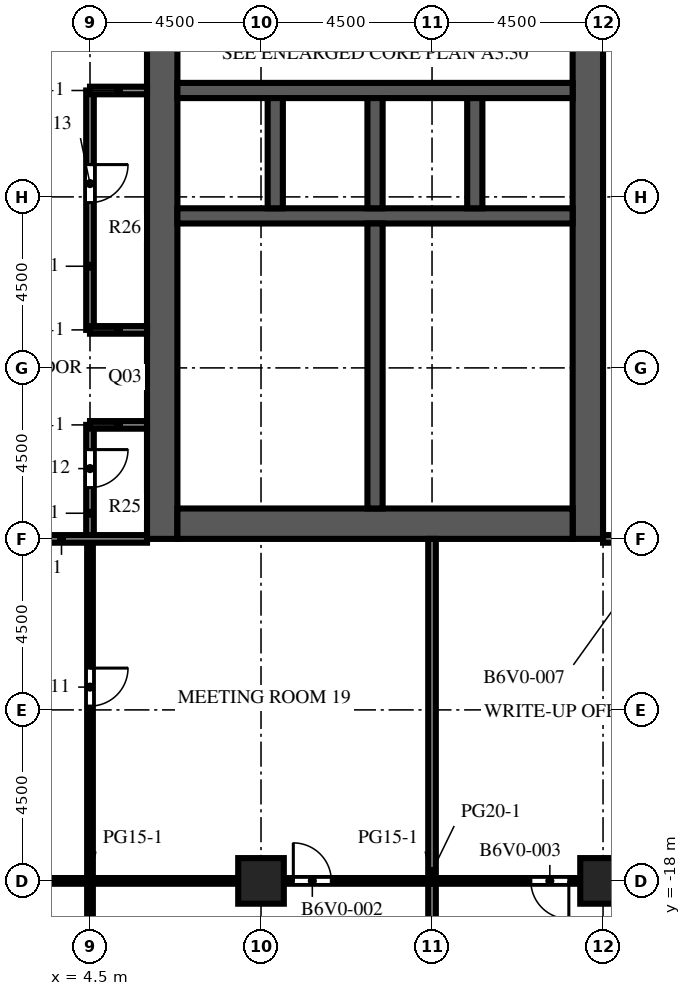
"""IFC4 building model, lengths in metres.
Left out: names, types, materials, properties, quantities, classifications, styles, units other than length and angle.
Written with IfcOpenShell. Run it as: python <this file> out.ifc"""

import sys

from ifc_helpers import new_model, si_unit, direction, frame, frame_2d, origin, origin_2d, place, context, subcontext, project, spatial, rectangle, extrude, element, fill, save


model = new_model("IFC4")
c1 = context("Model", 3, precision=1e-05, world=origin(), true_north=direction((0.0, 1.0)))
c2 = subcontext(c1, "Body", "Model", "MODEL_VIEW")
j1 = project(units=[si_unit("LENGTHUNIT", "METRE"), si_unit("PLANEANGLEUNIT", "RADIAN")], contexts=[c1])
p1 = place(None, origin())
s1 = spatial("IfcSite", under=j1, at=p1, CompositionType="ELEMENT")
p2 = place(p1, origin())
s2 = spatial("IfcBuilding", under=s1, at=p2, CompositionType="ELEMENT")
p3 = place(p2, frame((0.0, 0.0, 195.6)))
s3 = spatial("IfcBuildingStorey", under=s2, at=p3, CompositionType="ELEMENT", Elevation=195.6)
for number, where, z_axis, x_axis in (
    (1, (9.0, -18.0, 0.0), (0.0, 0.0, 1.0), (1.0, 0.0, 0.0)),
    (2, (18.0, -18.0, 0.0), (0.0, 0.0, 1.0), (1.0, 0.0, 0.0)),
):
    element("IfcColumn", number, at=place(p3, frame(where, z_axis=z_axis, x_axis=x_axis)), inside=s3, PredefinedType="COLUMN", context=c2, shape_type="SweptSolid", body=[
        extrude(rectangle(XDim=1.2, YDim=1.2, at=origin_2d()), origin(), (0.0, 0.0, 1.0), 4.1),
    ])
p4 = place(p3, frame((6.4, -9.0, 0.0), z_axis=(0.0, 0.0, 1.0), x_axis=(0.0, 1.0, 0.0)))
e3 = element("IfcWall", 3, at=p4, inside=s3, PredefinedType="SHEAR", context=c2, shape_type="SweptSolid", body=[
    extrude(rectangle(XDim=27.5, YDim=0.8, at=frame_2d((13.75, 0.0))), origin(), (0.0, 0.0, 1.0), 4.1),
])
p5 = place(p4, frame((12.55, 0.0, 0.0)))
e4 = element("IfcOpeningElement", 4, at=p5, cuts=e3, PredefinedType="OPENING", context=c2, shape_type="SweptSolid", body=[
    extrude(rectangle(XDim=2.4, YDim=2.4, at=frame_2d((1.2, 1.2))), frame((0.0, 0.41, 0.0), z_axis=(0.0, -1.0, 0.0), x_axis=(1.0, 0.0, 0.0)), (0.0, 0.0, 1.0), 0.82),
])
p6 = place(p4, frame((3.95, 0.0, 0.0)))
e5 = element("IfcOpeningElement", 5, at=p6, cuts=e3, PredefinedType="OPENING", context=c2, shape_type="SweptSolid", body=[
    extrude(rectangle(XDim=1.2, YDim=2.1, at=frame_2d((0.6, 1.05))), frame((0.0, 0.41, 0.0), z_axis=(0.0, -1.0, 0.0), x_axis=(1.0, 0.0, 0.0)), (0.0, 0.0, 1.0), 0.82),
])
p7 = place(p4, frame((19.45, 0.0, 0.0)))
e6 = element("IfcOpeningElement", 6, at=p7, cuts=e3, PredefinedType="OPENING", context=c2, shape_type="SweptSolid", body=[
    extrude(rectangle(XDim=1.0, YDim=2.1, at=frame_2d((0.5, 1.05))), frame((0.0, 0.41, 0.0), z_axis=(0.0, -1.0, 0.0), x_axis=(1.0, 0.0, 0.0)), (0.0, 0.0, 1.0), 0.82),
])
p8 = place(p4, frame((21.137, 0.0, 0.0)))
e7 = element("IfcOpeningElement", 7, at=p8, cuts=e3, PredefinedType="OPENING", context=c2, shape_type="SweptSolid", body=[
    extrude(rectangle(XDim=1.0, YDim=2.1, at=frame_2d((0.5, 1.05))), frame((0.0, 0.41, 0.0), z_axis=(0.0, -1.0, 0.0), x_axis=(1.0, 0.0, 0.0)), (0.0, 0.0, 1.0), 0.82),
])
p9 = place(p4, frame((23.2, 0.0, 0.0)))
e8 = element("IfcOpeningElement", 8, at=p9, cuts=e3, PredefinedType="OPENING", context=c2, shape_type="SweptSolid", body=[
    extrude(rectangle(XDim=1.0, YDim=2.1, at=frame_2d((0.5, 1.05))), frame((0.0, 0.41, 0.0), z_axis=(0.0, -1.0, 0.0), x_axis=(1.0, 0.0, 0.0)), (0.0, 0.0, 1.0), 0.82),
])
p10 = place(p4, frame((25.262, 0.0, 0.0)))
e9 = element("IfcOpeningElement", 9, at=p10, cuts=e3, PredefinedType="OPENING", context=c2, shape_type="SweptSolid", body=[
    extrude(rectangle(XDim=1.0, YDim=2.1, at=frame_2d((0.5, 1.05))), frame((0.0, 0.41, 0.0), z_axis=(0.0, -1.0, 0.0), x_axis=(1.0, 0.0, 0.0)), (0.0, 0.0, 1.0), 0.82),
])
p11 = place(p3, frame((17.6, -9.0, 0.0), z_axis=(0.0, 0.0, 1.0), x_axis=(0.0, 1.0, 0.0)))
e10 = element("IfcWall", 10, at=p11, inside=s3, PredefinedType="SHEAR", context=c2, shape_type="SweptSolid", body=[
    extrude(rectangle(XDim=27.5, YDim=0.8, at=frame_2d((13.75, 0.0))), origin(), (0.0, 0.0, 1.0), 4.1),
])
p12 = place(p11, frame((12.55, 0.0, 0.0)))
e11 = element("IfcOpeningElement", 11, at=p12, cuts=e10, PredefinedType="OPENING", context=c2, shape_type="SweptSolid", body=[
    extrude(rectangle(XDim=2.4, YDim=2.4, at=frame_2d((1.2, 1.2))), frame((0.0, 0.41, 0.0), z_axis=(0.0, -1.0, 0.0), x_axis=(1.0, 0.0, 0.0)), (0.0, 0.0, 1.0), 0.82),
])
p13 = place(p11, frame((6.825, 0.0, 0.0)))
e12 = element("IfcOpeningElement", 12, at=p13, cuts=e10, PredefinedType="OPENING", context=c2, shape_type="SweptSolid", body=[
    extrude(rectangle(XDim=1.2, YDim=2.1, at=frame_2d((0.6, 1.05))), frame((0.0, 0.41, 0.0), z_axis=(0.0, -1.0, 0.0), x_axis=(1.0, 0.0, 0.0)), (0.0, 0.0, 1.0), 0.82),
])
p14 = place(p11, frame((19.475, 0.0, 0.0)))
e13 = element("IfcOpeningElement", 13, at=p14, cuts=e10, PredefinedType="OPENING", context=c2, shape_type="SweptSolid", body=[
    extrude(rectangle(XDim=1.2, YDim=2.1, at=frame_2d((0.6, 1.05))), frame((0.0, 0.41, 0.0), z_axis=(0.0, -1.0, 0.0), x_axis=(1.0, 0.0, 0.0)), (0.0, 0.0, 1.0), 0.82),
])
p15 = place(p3, frame((6.8, -8.6, 0.0), z_axis=(0.0, 0.0, 1.0), x_axis=(1.0, 0.0, 0.0)))
e14 = element("IfcWall", 14, at=p15, inside=s3, PredefinedType="SHEAR", context=c2, shape_type="SweptSolid", body=[
    extrude(rectangle(XDim=10.4, YDim=0.8, at=frame_2d((5.2, 0.0))), origin(), (0.0, 0.0, 1.0), 4.1),
])
p16 = place(p3, frame((6.8, -0.5, 0.0), z_axis=(0.0, 0.0, 1.0), x_axis=(1.0, 0.0, 0.0)))
e15 = element("IfcWall", 15, at=p16, inside=s3, PredefinedType="SHEAR", context=c2, shape_type="SweptSolid", body=[
    extrude(rectangle(XDim=10.4, YDim=0.4, at=frame_2d((5.2, 0.0))), origin(), (0.0, 0.0, 1.0), 4.1),
])
p17 = place(p3, frame((6.8, 2.8, 0.0), z_axis=(0.0, 0.0, 1.0), x_axis=(1.0, 0.0, 0.0)))
e16 = element("IfcWall", 16, at=p17, inside=s3, PredefinedType="SHEAR", context=c2, shape_type="SweptSolid", body=[
    extrude(rectangle(XDim=10.4, YDim=0.4, at=frame_2d((5.2, 0.0))), origin(), (0.0, 0.0, 1.0), 4.1),
])
p18 = place(p17, frame((0.738, 0.0, 0.0)))
e17 = element("IfcOpeningElement", 17, at=p18, cuts=e16, PredefinedType="OPENING", context=c2, shape_type="SweptSolid", body=[
    extrude(rectangle(XDim=1.1, YDim=2.1, at=frame_2d((0.55, 1.05))), frame((0.0, 0.21, 0.0), z_axis=(0.0, -1.0, 0.0), x_axis=(1.0, 0.0, 0.0)), (0.0, 0.0, 1.0), 0.42),
])
p19 = place(p17, frame((3.337, 0.0, 0.0)))
e18 = element("IfcOpeningElement", 18, at=p19, cuts=e16, PredefinedType="OPENING", context=c2, shape_type="SweptSolid", body=[
    extrude(rectangle(XDim=1.1, YDim=2.1, at=frame_2d((0.55, 1.05))), frame((0.0, 0.21, 0.0), z_axis=(0.0, -1.0, 0.0), x_axis=(1.0, 0.0, 0.0)), (0.0, 0.0, 1.0), 0.42),
])
p20 = place(p17, frame((6.012, 0.0, 0.0)))
e19 = element("IfcOpeningElement", 19, at=p20, cuts=e16, PredefinedType="OPENING", context=c2, shape_type="SweptSolid", body=[
    extrude(rectangle(XDim=1.0, YDim=2.1, at=frame_2d((0.5, 1.05))), frame((0.0, 0.21, 0.0), z_axis=(0.0, -1.0, 0.0), x_axis=(1.0, 0.0, 0.0)), (0.0, 0.0, 1.0), 0.42),
])
p21 = place(p17, frame((8.613, 0.0, 0.0)))
e20 = element("IfcOpeningElement", 20, at=p21, cuts=e16, PredefinedType="OPENING", context=c2, shape_type="SweptSolid", body=[
    extrude(rectangle(XDim=1.0, YDim=2.1, at=frame_2d((0.5, 1.05))), frame((0.0, 0.21, 0.0), z_axis=(0.0, -1.0, 0.0), x_axis=(1.0, 0.0, 0.0)), (0.0, 0.0, 1.0), 0.42),
])
for number, where, z_axis, x_axis in (
    (21, (9.375, -0.3, 0.0), (0.0, 0.0, 1.0), (0.0, 1.0, 0.0)),
    (22, (12.0, -0.3, 0.0), (0.0, 0.0, 1.0), (0.0, 1.0, 0.0)),
    (23, (14.625, -0.3, 0.0), (0.0, 0.0, 1.0), (0.0, 1.0, 0.0)),
):
    element("IfcWall", number, at=place(p3, frame(where, z_axis=z_axis, x_axis=x_axis)), inside=s3, PredefinedType="SHEAR", context=c2, shape_type="SweptSolid", body=[
        extrude(rectangle(XDim=2.9, YDim=0.4, at=frame_2d((1.45, 0.0))), origin(), (0.0, 0.0, 1.0), 4.1),
    ])
p22 = place(p3, frame((12.0, -8.2, 0.0), z_axis=(0.0, 0.0, 1.0), x_axis=(0.0, 1.0, 0.0)))
e24 = element("IfcWall", 24, at=p22, inside=s3, PredefinedType="SHEAR", context=c2, shape_type="SweptSolid", body=[
    extrude(rectangle(XDim=7.5, YDim=0.4, at=frame_2d((3.75, 0.0))), origin(), (0.0, 0.0, 1.0), 4.1),
])
p23 = place(p3, frame((6.8, -5.95, 0.0), z_axis=(0.0, 0.0, 1.0), x_axis=(1.0, 0.0, 0.0)))
e25 = element("IfcWall", 25, at=p23, inside=s3, PredefinedType="PARTITIONING", context=c2, shape_type="SweptSolid", body=[
    extrude(rectangle(XDim=1.6, YDim=0.1, at=frame_2d((0.8, 0.0))), origin(), (0.0, 0.0, 1.0), 3.65),
])
p24 = place(p23, frame((0.3, 0.0, 0.0)))
e26 = element("IfcOpeningElement", 26, at=p24, cuts=e25, PredefinedType="OPENING", context=c2, shape_type="SweptSolid", body=[
    extrude(rectangle(XDim=1.0, YDim=2.1, at=frame_2d((0.5, 1.05))), frame((0.0, 0.06, 0.0), z_axis=(0.0, -1.0, 0.0), x_axis=(1.0, 0.0, 0.0)), (0.0, 0.0, 1.0), 0.12),
])
p25 = place(p3, frame((6.8, -2.95, 0.0), z_axis=(0.0, 0.0, 1.0), x_axis=(1.0, 0.0, 0.0)))
e27 = element("IfcWall", 27, at=p25, inside=s3, PredefinedType="PARTITIONING", context=c2, shape_type="SweptSolid", body=[
    extrude(rectangle(XDim=1.6, YDim=0.1, at=frame_2d((0.8, 0.0))), origin(), (0.0, 0.0, 1.0), 3.65),
])
p26 = place(p25, frame((0.3, 0.0, 0.0)))
e28 = element("IfcOpeningElement", 28, at=p26, cuts=e27, PredefinedType="OPENING", context=c2, shape_type="SweptSolid", body=[
    extrude(rectangle(XDim=1.0, YDim=2.1, at=frame_2d((0.5, 1.05))), frame((0.0, 0.06, 0.0), z_axis=(0.0, -1.0, 0.0), x_axis=(1.0, 0.0, 0.0)), (0.0, 0.0, 1.0), 0.12),
])
p27 = place(p3, frame((8.4, -5.95, 0.0), z_axis=(0.0, 0.0, 1.0), x_axis=(0.0, 1.0, 0.0)))
e29 = element("IfcWall", 29, at=p27, inside=s3, PredefinedType="PARTITIONING", context=c2, shape_type="SweptSolid", body=[
    extrude(rectangle(XDim=3.0, YDim=0.1, at=frame_2d((1.5, 0.0))), origin(), (0.0, 0.0, 1.0), 3.65),
])
p28 = place(p27, frame((1.0, 0.0, 0.0)))
e30 = element("IfcOpeningElement", 30, at=p28, cuts=e29, PredefinedType="OPENING", context=c2, shape_type="SweptSolid", body=[
    extrude(rectangle(XDim=1.0, YDim=2.1, at=frame_2d((0.5, 1.05))), frame((0.0, 0.06, 0.0), z_axis=(0.0, -1.0, 0.0), x_axis=(1.0, 0.0, 0.0)), (0.0, 0.0, 1.0), 0.12),
])
for number, where, z_axis, x_axis in (
    (31, (8.4, -5.95, 0.0), (0.0, 0.0, 1.0), (1.0, 0.0, 0.0)),
    (32, (8.4, -2.95, 0.0), (0.0, 0.0, 1.0), (1.0, 0.0, 0.0)),
):
    element("IfcWall", number, at=place(p3, frame(where, z_axis=z_axis, x_axis=x_axis)), inside=s3, PredefinedType="PARTITIONING", context=c2, shape_type="SweptSolid", body=[
        extrude(rectangle(XDim=3.4, YDim=0.1, at=frame_2d((1.7, 0.0))), origin(), (0.0, 0.0, 1.0), 3.65),
    ])
p29 = place(p3, frame((4.5, -9.0, 0.0), z_axis=(0.0, 0.0, 1.0), x_axis=(0.0, -1.0, 0.0)))
e33 = element("IfcWall", 33, at=p29, inside=s3, PredefinedType="PARTITIONING", context=c2, shape_type="SweptSolid", body=[
    extrude(rectangle(XDim=17.5, YDim=0.15, at=frame_2d((8.75, 0.0))), origin(), (0.0, 0.0, 1.0), 3.65),
])
p30 = place(p29, frame((3.4, 0.0, 0.0)))
e34 = element("IfcOpeningElement", 34, at=p30, cuts=e33, PredefinedType="OPENING", context=c2, shape_type="SweptSolid", body=[
    extrude(rectangle(XDim=1.0, YDim=2.1, at=frame_2d((0.5, 1.05))), frame((0.0, 0.085, 0.0), z_axis=(0.0, -1.0, 0.0), x_axis=(1.0, 0.0, 0.0)), (0.0, 0.0, 1.0), 0.17),
])
p31 = place(p3, frame((4.5, -6.0, 0.0), z_axis=(0.0, 0.0, 1.0), x_axis=(0.0, -1.0, 0.0)))
e35 = element("IfcWall", 35, at=p31, inside=s3, PredefinedType="PARTITIONING", context=c2, shape_type="SweptSolid", body=[
    extrude(rectangle(XDim=3.0, YDim=0.2, at=frame_2d((1.5, 0.0))), origin(), (0.0, 0.0, 1.0), 3.65),
])
p32 = place(p31, frame((0.65, 0.0, 0.0)))
e36 = element("IfcOpeningElement", 36, at=p32, cuts=e35, PredefinedType="OPENING", context=c2, shape_type="SweptSolid", body=[
    extrude(rectangle(XDim=1.0, YDim=2.1, at=frame_2d((0.5, 1.05))), frame((0.0, 0.11, 0.0), z_axis=(0.0, -1.0, 0.0), x_axis=(1.0, 0.0, 0.0)), (0.0, 0.0, 1.0), 0.22),
])
p33 = place(p3, frame((4.5, 2.8, 0.0), z_axis=(0.0, 0.0, 1.0), x_axis=(0.0, -1.0, 0.0)))
e37 = element("IfcWall", 37, at=p33, inside=s3, PredefinedType="PARTITIONING", context=c2, shape_type="SweptSolid", body=[
    extrude(rectangle(XDim=6.3, YDim=0.2, at=frame_2d((3.15, 0.0))), origin(), (0.0, 0.0, 1.0), 3.65),
])
p34 = place(p33, frame((1.95, 0.0, 0.0)))
e38 = element("IfcOpeningElement", 38, at=p34, cuts=e37, PredefinedType="OPENING", context=c2, shape_type="SweptSolid", body=[
    extrude(rectangle(XDim=1.0, YDim=2.1, at=frame_2d((0.5, 1.05))), frame((0.0, 0.11, 0.0), z_axis=(0.0, -1.0, 0.0), x_axis=(1.0, 0.0, 0.0)), (0.0, 0.0, 1.0), 0.22),
])
p35 = place(p3, frame((13.5, -26.5, 0.0), z_axis=(0.0, 0.0, 1.0), x_axis=(0.0, 1.0, 0.0)))
e39 = element("IfcWall", 39, at=p35, inside=s3, PredefinedType="PARTITIONING", context=c2, shape_type="SweptSolid", body=[
    extrude(rectangle(XDim=17.5, YDim=0.2, at=frame_2d((8.75, 0.0))), origin(), (0.0, 0.0, 1.0), 3.65),
])
p36 = place(p3, frame((0.6, -18.0, 0.0), z_axis=(0.0, 0.0, 1.0), x_axis=(1.0, 0.0, 0.0)))
e40 = element("IfcWall", 40, at=p36, inside=s3, PredefinedType="PARTITIONING", context=c2, shape_type="SweptSolid", body=[
    extrude(rectangle(XDim=7.8, YDim=0.15, at=frame_2d((3.9, 0.0))), origin(), (0.0, 0.0, 1.0), 3.65),
])
p37 = place(p3, frame((17.4, -18.0, 0.0), z_axis=(0.0, 0.0, 1.0), x_axis=(-1.0, 0.0, 0.0)))
e41 = element("IfcWall", 41, at=p37, inside=s3, PredefinedType="PARTITIONING", context=c2, shape_type="SweptSolid", body=[
    extrude(rectangle(XDim=7.8, YDim=0.15, at=frame_2d((3.9, 0.0))), origin(), (0.0, 0.0, 1.0), 3.65),
])
p38 = place(p37, frame((6.55, 0.0, 0.0)))
e42 = element("IfcOpeningElement", 42, at=p38, cuts=e41, PredefinedType="OPENING", context=c2, shape_type="SweptSolid", body=[
    extrude(rectangle(XDim=1.0, YDim=2.1, at=frame_2d((0.5, 1.05))), frame((0.0, 0.085, 0.0), z_axis=(0.0, -1.0, 0.0), x_axis=(1.0, 0.0, 0.0)), (0.0, 0.0, 1.0), 0.17),
])
p39 = place(p37, frame((0.3, 0.0, 0.0)))
e43 = element("IfcOpeningElement", 43, at=p39, cuts=e41, PredefinedType="OPENING", context=c2, shape_type="SweptSolid", body=[
    extrude(rectangle(XDim=1.0, YDim=2.1, at=frame_2d((0.5, 1.05))), frame((0.0, 0.085, 0.0), z_axis=(0.0, -1.0, 0.0), x_axis=(1.0, 0.0, 0.0)), (0.0, 0.0, 1.0), 0.17),
])
p40 = place(p3, frame((1.5, -9.0, 0.0), z_axis=(0.0, 0.0, 1.0), x_axis=(1.0, 0.0, 0.0)))
e44 = element("IfcWall", 44, at=p40, inside=s3, PredefinedType="PARTITIONING", context=c2, shape_type="SweptSolid", body=[
    extrude(rectangle(XDim=4.5, YDim=0.2, at=frame_2d((2.25, 0.0))), origin(), (0.0, 0.0, 1.0), 3.65),
])
p41 = place(p3, frame((21.0, -9.0, 0.0), z_axis=(0.0, 0.0, 1.0), x_axis=(-1.0, 0.0, 0.0)))
e45 = element("IfcWall", 45, at=p41, inside=s3, PredefinedType="PARTITIONING", context=c2, shape_type="SweptSolid", body=[
    extrude(rectangle(XDim=3.0, YDim=0.2, at=frame_2d((1.5, 0.0))), origin(), (0.0, 0.0, 1.0), 3.65),
])
p42 = place(p41, frame((0.9, 0.0, 0.0)))
e46 = element("IfcOpeningElement", 46, at=p42, cuts=e45, PredefinedType="OPENING", context=c2, shape_type="SweptSolid", body=[
    extrude(rectangle(XDim=1.0, YDim=2.1, at=frame_2d((0.5, 1.05))), frame((0.0, 0.11, 0.0), z_axis=(0.0, -1.0, 0.0), x_axis=(1.0, 0.0, 0.0)), (0.0, 0.0, 1.0), 0.22),
])
for number, where, z_axis, x_axis in (
    (47, (4.5, -6.0, 0.0), (0.0, 0.0, 1.0), (1.0, 0.0, 0.0)),
    (48, (4.5, -3.5, 0.0), (0.0, 0.0, 1.0), (1.0, 0.0, 0.0)),
    (49, (4.5, 2.8, 0.0), (0.0, 0.0, 1.0), (1.0, 0.0, 0.0)),
):
    element("IfcWall", number, at=place(p3, frame(where, z_axis=z_axis, x_axis=x_axis)), inside=s3, PredefinedType="PARTITIONING", context=c2, shape_type="SweptSolid", body=[
        extrude(rectangle(XDim=1.5, YDim=0.2, at=frame_2d((0.75, 0.0))), origin(), (0.0, 0.0, 1.0), 3.65),
    ])
p43 = place(p18, origin())
e50 = element("IfcDoor", 50, at=p43, inside=s3, OperationType="DOUBLE_DOOR_SLIDING", PredefinedType="DOOR", context=c2, shape_type="SweptSolid", body=[
    extrude(rectangle(XDim=1.1, YDim=2.1, at=frame_2d((0.55, 1.05))), frame((0.0, 0.025, 0.0), z_axis=(0.0, -1.0, 0.0), x_axis=(1.0, 0.0, 0.0)), (0.0, 0.0, 1.0), 0.05),
])
fill(e17, e50)
p44 = place(p19, origin())
e51 = element("IfcDoor", 51, at=p44, inside=s3, OperationType="DOUBLE_DOOR_SLIDING", PredefinedType="DOOR", context=c2, shape_type="SweptSolid", body=[
    extrude(rectangle(XDim=1.1, YDim=2.1, at=frame_2d((0.55, 1.05))), frame((0.0, 0.025, 0.0), z_axis=(0.0, -1.0, 0.0), x_axis=(1.0, 0.0, 0.0)), (0.0, 0.0, 1.0), 0.05),
])
fill(e18, e51)
p45 = place(p5, origin())
e52 = element("IfcDoor", 52, at=p45, inside=s3, OperationType="DOUBLE_DOOR_DOUBLE_SWING", PredefinedType="DOOR", context=c2, shape_type="SweptSolid", body=[
    extrude(rectangle(XDim=2.4, YDim=2.4, at=frame_2d((1.2, 1.2))), frame((0.0, 0.025, 0.0), z_axis=(0.0, -1.0, 0.0), x_axis=(1.0, 0.0, 0.0)), (0.0, 0.0, 1.0), 0.05),
])
fill(e4, e52)
p46 = place(p12, origin())
e53 = element("IfcDoor", 53, at=p46, inside=s3, OperationType="DOUBLE_DOOR_DOUBLE_SWING", PredefinedType="DOOR", context=c2, shape_type="SweptSolid", body=[
    extrude(rectangle(XDim=2.4, YDim=2.4, at=frame_2d((1.2, 1.2))), frame((0.0, 0.025, 0.0), z_axis=(0.0, -1.0, 0.0), x_axis=(1.0, 0.0, 0.0)), (0.0, 0.0, 1.0), 0.05),
])
fill(e11, e53)
p47 = place(p13, frame((1.2, 0.0, 0.0), z_axis=(0.0, 0.0, 1.0), x_axis=(-1.0, 0.0, 0.0)))
e54 = element("IfcDoor", 54, at=p47, inside=s3, OperationType="SINGLE_SWING_LEFT", PredefinedType="DOOR", context=c2, shape_type="SweptSolid", body=[
    extrude(rectangle(XDim=1.2, YDim=2.1, at=frame_2d((0.6, 1.05))), frame((0.0, 0.025, 0.0), z_axis=(0.0, -1.0, 0.0), x_axis=(1.0, 0.0, 0.0)), (0.0, 0.0, 1.0), 0.05),
])
fill(e12, e54)
p48 = place(p20, origin())
e55 = element("IfcDoor", 55, at=p48, inside=s3, OperationType="SINGLE_SWING_LEFT", PredefinedType="DOOR", context=c2, shape_type="SweptSolid", body=[
    extrude(rectangle(XDim=1.0, YDim=2.1, at=frame_2d((0.5, 1.05))), frame((0.0, 0.025, 0.0), z_axis=(0.0, -1.0, 0.0), x_axis=(1.0, 0.0, 0.0)), (0.0, 0.0, 1.0), 0.05),
])
fill(e19, e55)
p49 = place(p21, origin())
e56 = element("IfcDoor", 56, at=p49, inside=s3, OperationType="SINGLE_SWING_RIGHT", PredefinedType="DOOR", context=c2, shape_type="SweptSolid", body=[
    extrude(rectangle(XDim=1.0, YDim=2.1, at=frame_2d((0.5, 1.05))), frame((0.0, 0.025, 0.0), z_axis=(0.0, -1.0, 0.0), x_axis=(1.0, 0.0, 0.0)), (0.0, 0.0, 1.0), 0.05),
])
fill(e20, e56)
p50 = place(p6, origin())
e57 = element("IfcDoor", 57, at=p50, inside=s3, OperationType="SINGLE_SWING_RIGHT", PredefinedType="DOOR", context=c2, shape_type="SweptSolid", body=[
    extrude(rectangle(XDim=1.2, YDim=2.1, at=frame_2d((0.6, 1.05))), frame((0.0, -0.325, 0.0), z_axis=(0.0, -1.0, 0.0), x_axis=(1.0, 0.0, 0.0)), (0.0, 0.0, 1.0), 0.05),
])
fill(e5, e57)
p51 = place(p24, origin())
e58 = element("IfcDoor", 58, at=p51, inside=s3, OperationType="SINGLE_SWING_LEFT", PredefinedType="DOOR", context=c2, shape_type="SweptSolid", body=[
    extrude(rectangle(XDim=1.0, YDim=2.1, at=frame_2d((0.5, 1.05))), frame((0.0, 0.025, 0.0), z_axis=(0.0, -1.0, 0.0), x_axis=(1.0, 0.0, 0.0)), (0.0, 0.0, 1.0), 0.05),
])
fill(e26, e58)
p52 = place(p26, origin())
e59 = element("IfcDoor", 59, at=p52, inside=s3, OperationType="SINGLE_SWING_RIGHT", PredefinedType="DOOR", context=c2, shape_type="SweptSolid", body=[
    extrude(rectangle(XDim=1.0, YDim=2.1, at=frame_2d((0.5, 1.05))), frame((0.0, 0.025, 0.0), z_axis=(0.0, -1.0, 0.0), x_axis=(1.0, 0.0, 0.0)), (0.0, 0.0, 1.0), 0.05),
])
fill(e28, e59)
p53 = place(p28, origin())
e60 = element("IfcDoor", 60, at=p53, inside=s3, OperationType="SINGLE_SWING_LEFT", PredefinedType="DOOR", context=c2, shape_type="SweptSolid", body=[
    extrude(rectangle(XDim=1.0, YDim=2.1, at=frame_2d((0.5, 1.05))), frame((0.0, 0.025, 0.0), z_axis=(0.0, -1.0, 0.0), x_axis=(1.0, 0.0, 0.0)), (0.0, 0.0, 1.0), 0.05),
])
fill(e30, e60)
p54 = place(p38, origin())
e61 = element("IfcDoor", 61, at=p54, inside=s3, OperationType="SINGLE_SWING_RIGHT", PredefinedType="DOOR", context=c2, shape_type="SweptSolid", body=[
    extrude(rectangle(XDim=1.0, YDim=2.1, at=frame_2d((0.5, 1.05))), frame((0.0, 0.025, 0.0), z_axis=(0.0, -1.0, 0.0), x_axis=(1.0, 0.0, 0.0)), (0.0, 0.0, 1.0), 0.05),
])
fill(e42, e61)
p55 = place(p39, origin())
e62 = element("IfcDoor", 62, at=p55, inside=s3, OperationType="SINGLE_SWING_LEFT", PredefinedType="DOOR", context=c2, shape_type="SweptSolid", body=[
    extrude(rectangle(XDim=1.0, YDim=2.1, at=frame_2d((0.5, 1.05))), frame((0.0, 0.025, 0.0), z_axis=(0.0, -1.0, 0.0), x_axis=(1.0, 0.0, 0.0)), (0.0, 0.0, 1.0), 0.05),
])
fill(e43, e62)
p56 = place(p30, origin())
e63 = element("IfcDoor", 63, at=p56, inside=s3, OperationType="SINGLE_SWING_LEFT", PredefinedType="DOOR", context=c2, shape_type="SweptSolid", body=[
    extrude(rectangle(XDim=1.0, YDim=2.1, at=frame_2d((0.5, 1.05))), frame((0.0, 0.025, 0.0), z_axis=(0.0, -1.0, 0.0), x_axis=(1.0, 0.0, 0.0)), (0.0, 0.0, 1.0), 0.05),
])
fill(e34, e63)
p57 = place(p32, origin())
e64 = element("IfcDoor", 64, at=p57, inside=s3, OperationType="SINGLE_SWING_LEFT", PredefinedType="DOOR", context=c2, shape_type="SweptSolid", body=[
    extrude(rectangle(XDim=1.0, YDim=2.1, at=frame_2d((0.5, 1.05))), frame((0.0, 0.025, 0.0), z_axis=(0.0, -1.0, 0.0), x_axis=(1.0, 0.0, 0.0)), (0.0, 0.0, 1.0), 0.05),
])
fill(e36, e64)
p58 = place(p34, origin())
e65 = element("IfcDoor", 65, at=p58, inside=s3, OperationType="SINGLE_SWING_LEFT", PredefinedType="DOOR", context=c2, shape_type="SweptSolid", body=[
    extrude(rectangle(XDim=1.0, YDim=2.1, at=frame_2d((0.5, 1.05))), frame((0.0, 0.025, 0.0), z_axis=(0.0, -1.0, 0.0), x_axis=(1.0, 0.0, 0.0)), (0.0, 0.0, 1.0), 0.05),
])
fill(e38, e65)
save(model, sys.argv[1])
